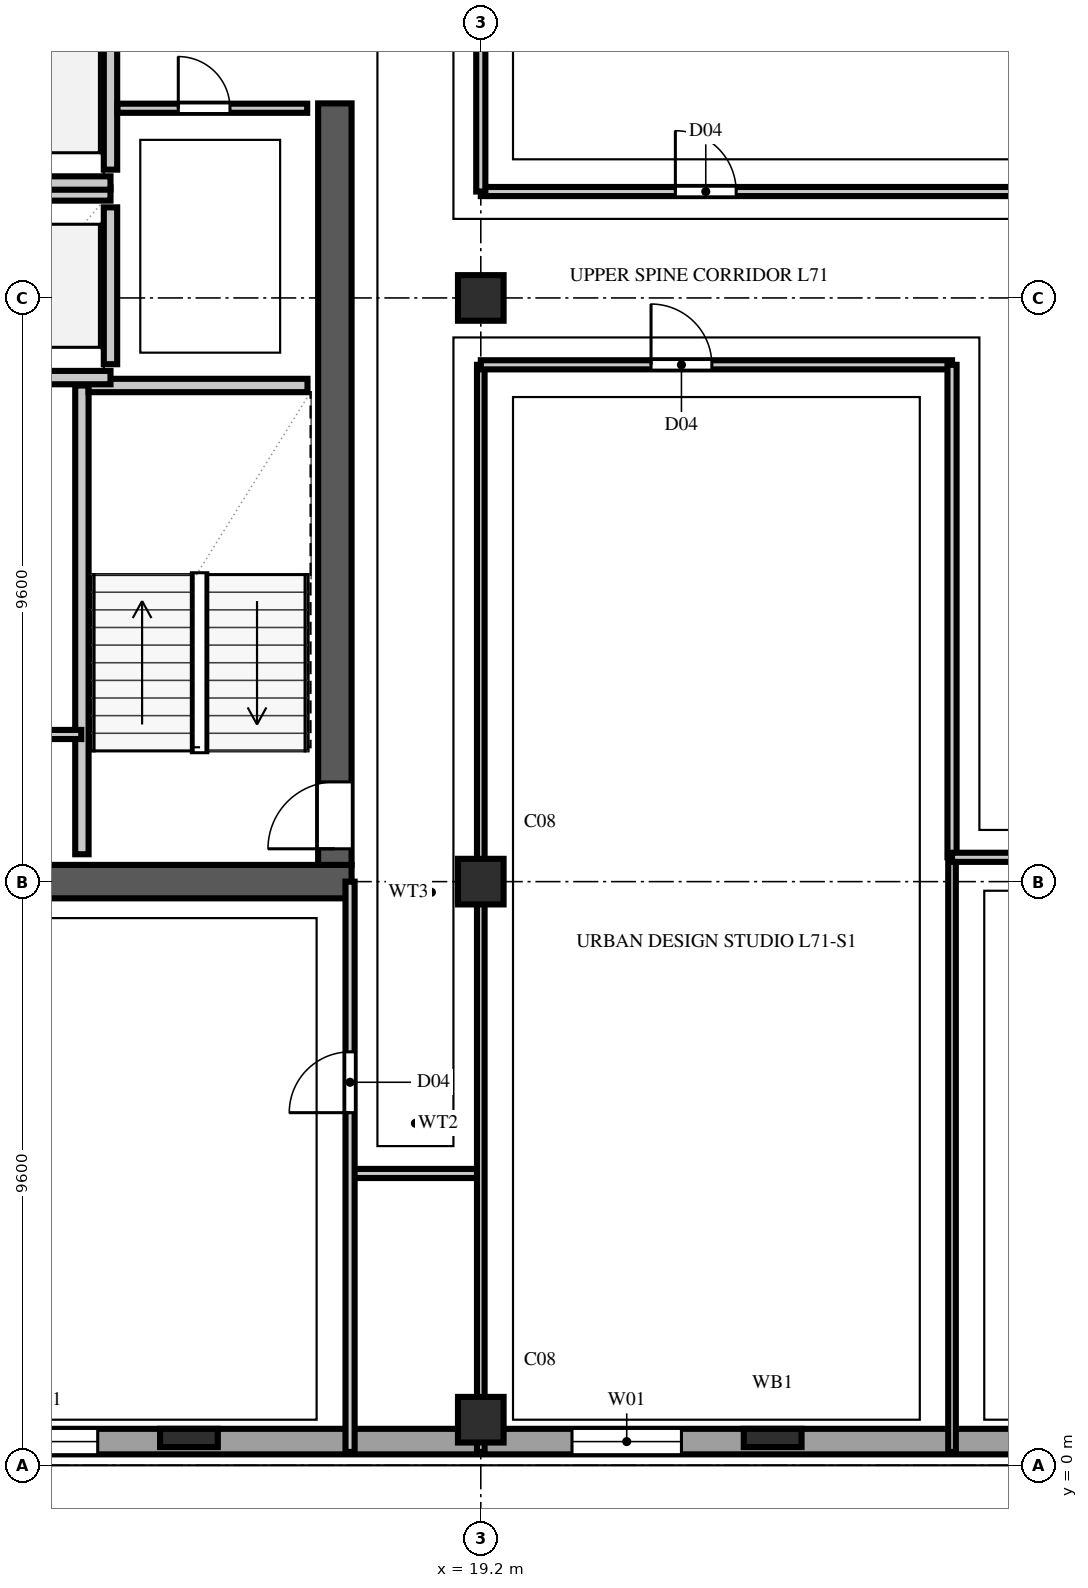
"""IFC4 building model, lengths in metres.
Left out: names, types, materials, properties, quantities, classifications, styles, units other than length and angle.
Written with IfcOpenShell. Run it as: python <this file> out.ifc"""

import sys

from ifc_helpers import new_model, si_unit, direction, frame, frame_2d, origin, origin_2d, place, context, subcontext, project, spatial, rectangle, extrude, element, fill, save


model = new_model("IFC4")
c1 = context("Model", 3, precision=1e-05, world=origin(), true_north=direction((0.0, 1.0)))
c2 = subcontext(c1, "Body", "Model", "MODEL_VIEW")
j1 = project(units=[si_unit("LENGTHUNIT", "METRE"), si_unit("PLANEANGLEUNIT", "RADIAN")], contexts=[c1])
p1 = place(None, origin())
s1 = spatial("IfcSite", under=j1, at=p1, CompositionType="ELEMENT")
p2 = place(p1, origin())
s2 = spatial("IfcBuilding", under=s1, at=p2, CompositionType="ELEMENT")
p3 = place(p2, frame((0.0, 0.0, 281.0)))
s3 = spatial("IfcBuildingStorey", under=s2, at=p3, CompositionType="ELEMENT", Elevation=281.0)
p4 = place(p3, frame((2.475, 9.6, 0.0), z_axis=(0.0, 0.0, 1.0), x_axis=(1.0, 0.0, 0.0)))
e1 = element("IfcWall", 1, at=p4, inside=s3, PredefinedType="SHEAR", context=c2, shape_type="SweptSolid", body=[
    extrude(rectangle(XDim=14.6, YDim=0.55, at=frame_2d((7.3, 0.0))), origin(), (0.0, 0.0, 1.0), 3.54),
])
p5 = place(p3, frame((16.8, 9.875, 0.0), z_axis=(0.0, 0.0, 1.0), x_axis=(0.0, 1.0, 0.0)))
e2 = element("IfcWall", 2, at=p5, inside=s3, PredefinedType="SHEAR", context=c2, shape_type="SweptSolid", body=[
    extrude(rectangle(XDim=12.525, YDim=0.55, at=frame_2d((6.262, 0.0))), origin(), (0.0, 0.0, 1.0), 3.54),
])
p6 = place(p5, frame((0.265, 0.0, 0.0)))
e3 = element("IfcOpeningElement", 3, at=p6, cuts=e2, PredefinedType="OPENING", context=c2, shape_type="SweptSolid", body=[
    extrude(rectangle(XDim=1.1, YDim=2.2, at=frame_2d((0.55, 1.1))), frame((0.0, 0.287, 0.0), z_axis=(0.0, -1.0, 0.0), x_axis=(1.0, 0.0, 0.0)), (0.0, 0.0, 1.0), 0.574),
])
for number, where, z_axis, x_axis in (
    (4, (19.2, 0.75, 0.0), (0.0, 0.0, 1.0), (1.0, 0.0, 0.0)),
    (5, (19.2, 9.6, 0.0), (0.0, 0.0, 1.0), (1.0, 0.0, 0.0)),
    (6, (19.2, 19.2, 0.0), (0.0, 0.0, 1.0), (1.0, 0.0, 0.0)),
):
    element("IfcColumn", number, at=place(p3, frame(where, z_axis=z_axis, x_axis=x_axis)), inside=s3, PredefinedType="COLUMN", context=c2, shape_type="SweptSolid", body=[
        extrude(rectangle(XDim=0.75, YDim=0.75, at=origin_2d()), origin(), (0.0, 0.0, 1.0), 3.8),
    ])
for number, where, z_axis, x_axis in (
    (7, (14.4, 0.45, 0.0), (0.0, 0.0, 1.0), (1.0, 0.0, 0.0)),
    (8, (24.0, 0.45, 0.0), (0.0, 0.0, 1.0), (1.0, 0.0, 0.0)),
):
    element("IfcColumn", number, at=place(p3, frame(where, z_axis=z_axis, x_axis=x_axis)), inside=s3, PredefinedType="PILASTER", context=c2, shape_type="SweptSolid", body=[
        extrude(rectangle(XDim=0.95, YDim=0.3, at=origin_2d()), origin(), (0.0, 0.0, 1.0), 3.8),
    ])
p7 = place(p3, frame((1.84, 0.39, 0.0), z_axis=(0.0, 0.0, 1.0), x_axis=(1.0, 0.0, 0.0)))
e9 = element("IfcWall", 9, at=p7, inside=s3, PredefinedType="SOLIDWALL", context=c2, shape_type="SweptSolid", body=[
    extrude(rectangle(XDim=44.32, YDim=0.42, at=frame_2d((22.16, 0.0))), origin(), (0.0, 0.0, 1.0), 3.54),
])
p8 = place(p7, frame((4.46, 0.0, 0.85)))
e10 = element("IfcOpeningElement", 10, at=p8, cuts=e9, PredefinedType="OPENING", context=c2, shape_type="SweptSolid", body=[
    extrude(rectangle(XDim=1.8, YDim=1.85, at=frame_2d((0.9, 0.925))), frame((0.0, 0.222, 0.0), z_axis=(0.0, -1.0, 0.0), x_axis=(1.0, 0.0, 0.0)), (0.0, 0.0, 1.0), 0.444),
])
p9 = place(p7, frame((9.26, 0.0, 0.85)))
e11 = element("IfcOpeningElement", 11, at=p9, cuts=e9, PredefinedType="OPENING", context=c2, shape_type="SweptSolid", body=[
    extrude(rectangle(XDim=1.8, YDim=1.85, at=frame_2d((0.9, 0.925))), frame((0.0, 0.222, 0.0), z_axis=(0.0, -1.0, 0.0), x_axis=(1.0, 0.0, 0.0)), (0.0, 0.0, 1.0), 0.444),
])
p10 = place(p7, frame((18.86, 0.0, 0.85)))
e12 = element("IfcOpeningElement", 12, at=p10, cuts=e9, PredefinedType="OPENING", context=c2, shape_type="SweptSolid", body=[
    extrude(rectangle(XDim=1.8, YDim=1.85, at=frame_2d((0.9, 0.925))), frame((0.0, 0.222, 0.0), z_axis=(0.0, -1.0, 0.0), x_axis=(1.0, 0.0, 0.0)), (0.0, 0.0, 1.0), 0.444),
])
p11 = place(p7, frame((28.46, 0.0, 0.85)))
e13 = element("IfcOpeningElement", 13, at=p11, cuts=e9, PredefinedType="OPENING", context=c2, shape_type="SweptSolid", body=[
    extrude(rectangle(XDim=1.8, YDim=1.85, at=frame_2d((0.9, 0.925))), frame((0.0, 0.222, 0.0), z_axis=(0.0, -1.0, 0.0), x_axis=(1.0, 0.0, 0.0)), (0.0, 0.0, 1.0), 0.444),
])
p12 = place(p7, frame((33.26, 0.0, 0.85)))
e14 = element("IfcOpeningElement", 14, at=p12, cuts=e9, PredefinedType="OPENING", context=c2, shape_type="SweptSolid", body=[
    extrude(rectangle(XDim=1.8, YDim=1.85, at=frame_2d((0.9, 0.925))), frame((0.0, 0.222, 0.0), z_axis=(0.0, -1.0, 0.0), x_axis=(1.0, 0.0, 0.0)), (0.0, 0.0, 1.0), 0.444),
])
p13 = place(p7, frame((38.06, 0.0, 0.85)))
e15 = element("IfcOpeningElement", 15, at=p13, cuts=e9, PredefinedType="OPENING", context=c2, shape_type="SweptSolid", body=[
    extrude(rectangle(XDim=1.8, YDim=1.85, at=frame_2d((0.9, 0.925))), frame((0.0, 0.222, 0.0), z_axis=(0.0, -1.0, 0.0), x_axis=(1.0, 0.0, 0.0)), (0.0, 0.0, 1.0), 0.444),
])
p14 = place(p3, frame((12.64, 10.05, 0.0), z_axis=(0.0, 0.0, 1.0), x_axis=(0.0, 1.0, 0.0)))
e16 = element("IfcWall", 16, at=p14, inside=s3, PredefinedType="SOLIDWALL", context=c2, shape_type="SweptSolid", body=[
    extrude(rectangle(XDim=7.71, YDim=0.22, at=frame_2d((3.855, 0.0))), origin(), (0.0, 0.0, 1.0), 3.54),
])
p15 = place(p3, frame((12.75, 17.76, 0.0), z_axis=(0.0, 0.0, 1.0), x_axis=(1.0, 0.0, 0.0)))
e17 = element("IfcWall", 17, at=p15, inside=s3, PredefinedType="SOLIDWALL", context=c2, shape_type="SweptSolid", body=[
    extrude(rectangle(XDim=3.6, YDim=0.22, at=frame_2d((1.8, 0.0))), origin(), (0.0, 0.0, 1.0), 3.54),
])
p16 = place(p3, frame((13.11, 18.11, 0.0), z_axis=(0.0, 0.0, 1.0), x_axis=(0.0, 1.0, 0.0)))
e18 = element("IfcWall", 18, at=p16, inside=s3, PredefinedType="SOLIDWALL", context=c2, shape_type="SweptSolid", body=[
    extrude(rectangle(XDim=2.58, YDim=0.22, at=frame_2d((1.29, 0.0))), origin(), (0.0, 0.0, 1.0), 3.54),
])
for number, where, z_axis, x_axis in (
    (19, (10.49, 17.89, 0.0), (0.0, 0.0, 1.0), (1.0, 0.0, 0.0)),
    (20, (10.49, 20.91, 0.0), (0.0, 0.0, 1.0), (1.0, 0.0, 0.0)),
):
    element("IfcWall", number, at=place(p3, frame(where, z_axis=z_axis, x_axis=x_axis)), inside=s3, PredefinedType="SOLIDWALL", context=c2, shape_type="SweptSolid", body=[
        extrude(rectangle(XDim=2.62, YDim=0.22, at=frame_2d((1.31, 0.0))), origin(), (0.0, 0.0, 1.0), 3.54),
    ])
p17 = place(p3, frame((13.11, 21.31, 0.0), z_axis=(0.0, 0.0, 1.0), x_axis=(0.0, 1.0, 0.0)))
e21 = element("IfcWall", 21, at=p17, inside=s3, PredefinedType="SOLIDWALL", context=c2, shape_type="SweptSolid", body=[
    extrude(rectangle(XDim=2.58, YDim=0.22, at=frame_2d((1.29, 0.0))), origin(), (0.0, 0.0, 1.0), 3.54),
])
p18 = place(p3, frame((10.49, 21.09, 0.0), z_axis=(0.0, 0.0, 1.0), x_axis=(1.0, 0.0, 0.0)))
e22 = element("IfcWall", 22, at=p18, inside=s3, PredefinedType="SOLIDWALL", context=c2, shape_type="SweptSolid", body=[
    extrude(rectangle(XDim=2.62, YDim=0.22, at=frame_2d((1.31, 0.0))), origin(), (0.0, 0.0, 1.0), 3.54),
])
p19 = place(p3, frame((10.55, 12.02, 0.0), z_axis=(0.0, 0.0, 1.0), x_axis=(1.0, 0.0, 0.0)))
e23 = element("IfcWall", 23, at=p19, inside=s3, PredefinedType="PARTITIONING", context=c2, shape_type="SweptSolid", body=[
    extrude(rectangle(XDim=2.08, YDim=0.15, at=frame_2d((1.04, 0.0))), origin(), (0.0, 0.0, 1.0), 3.54),
])
p20 = place(p19, frame((0.5, 0.0, 0.0)))
e24 = element("IfcOpeningElement", 24, at=p20, cuts=e23, PredefinedType="OPENING", context=c2, shape_type="SweptSolid", body=[
    extrude(rectangle(XDim=0.85, YDim=2.1, at=frame_2d((0.425, 1.05))), frame((0.0, 0.087, 0.0), z_axis=(0.0, -1.0, 0.0), x_axis=(1.0, 0.0, 0.0)), (0.0, 0.0, 1.0), 0.174),
])
p21 = place(p3, frame((13.225, 22.32, 0.0), z_axis=(0.0, 0.0, 1.0), x_axis=(1.0, 0.0, 0.0)))
e25 = element("IfcWall", 25, at=p21, inside=s3, PredefinedType="PARTITIONING", context=c2, shape_type="SweptSolid", body=[
    extrude(rectangle(XDim=3.12, YDim=0.15, at=frame_2d((1.56, 0.0))), origin(), (0.0, 0.0, 1.0), 3.54),
])
p22 = place(p21, frame((1.0, 0.0, 0.0)))
e26 = element("IfcOpeningElement", 26, at=p22, cuts=e25, PredefinedType="OPENING", context=c2, shape_type="SweptSolid", body=[
    extrude(rectangle(XDim=0.85, YDim=2.1, at=frame_2d((0.425, 1.05))), frame((0.0, 0.087, 0.0), z_axis=(0.0, -1.0, 0.0), x_axis=(1.0, 0.0, 0.0)), (0.0, 0.0, 1.0), 0.174),
])
p23 = place(p3, frame((17.05, 4.8, 0.0), z_axis=(0.0, 0.0, 1.0), x_axis=(1.0, 0.0, 0.0)))
e27 = element("IfcWall", 27, at=p23, inside=s3, PredefinedType="PARTITIONING", context=c2, shape_type="SweptSolid", body=[
    extrude(rectangle(XDim=2.15, YDim=0.15, at=frame_2d((1.075, 0.0))), origin(), (0.0, 0.0, 1.0), 3.54),
])
p24 = place(p3, frame((17.05, 0.22, 0.0), z_axis=(0.0, 0.0, 1.0), x_axis=(0.0, 1.0, 0.0)))
e28 = element("IfcWall", 28, at=p24, inside=s3, PredefinedType="PARTITIONING", context=c2, shape_type="SweptSolid", body=[
    extrude(rectangle(XDim=9.38, YDim=0.15, at=frame_2d((4.69, 0.0))), origin(), (0.0, 0.0, 1.0), 3.54),
])
p25 = place(p24, frame((5.58, 0.0, 0.0)))
e29 = element("IfcOpeningElement", 29, at=p25, cuts=e28, PredefinedType="OPENING", context=c2, shape_type="SweptSolid", body=[
    extrude(rectangle(XDim=1.0, YDim=2.2, at=frame_2d((0.5, 1.1))), frame((0.0, 0.087, 0.0), z_axis=(0.0, -1.0, 0.0), x_axis=(1.0, 0.0, 0.0)), (0.0, 0.0, 1.0), 0.174),
])
p26 = place(p3, frame((19.2, 0.22, 0.0), z_axis=(0.0, 0.0, 1.0), x_axis=(0.0, 1.0, 0.0)))
e30 = element("IfcWall", 30, at=p26, inside=s3, PredefinedType="PARTITIONING", context=c2, shape_type="SweptSolid", body=[
    extrude(rectangle(XDim=0.53, YDim=0.125, at=frame_2d((0.265, 0.0))), origin(), (0.0, 0.0, 1.0), 3.54),
])
p27 = place(p3, frame((19.2, 0.75, 0.0), z_axis=(0.0, 0.0, 1.0), x_axis=(0.0, 1.0, 0.0)))
e31 = element("IfcWall", 31, at=p27, inside=s3, PredefinedType="PARTITIONING", context=c2, shape_type="SweptSolid", body=[
    extrude(rectangle(XDim=17.35, YDim=0.125, at=frame_2d((8.675, 0.0))), origin(), (0.0, 0.0, 1.0), 2.923),
])
p28 = place(p3, frame((19.2, 18.1, 0.0), z_axis=(0.0, 0.0, 1.0), x_axis=(1.0, 0.0, 0.0)))
e32 = element("IfcWall", 32, at=p28, inside=s3, PredefinedType="PARTITIONING", context=c2, shape_type="SweptSolid", body=[
    extrude(rectangle(XDim=7.75, YDim=0.15, at=frame_2d((3.875, 0.0))), origin(), (0.0, 0.0, 1.0), 3.54),
])
p29 = place(p28, frame((2.8, 0.0, 0.0)))
e33 = element("IfcOpeningElement", 33, at=p29, cuts=e32, PredefinedType="OPENING", context=c2, shape_type="SweptSolid", body=[
    extrude(rectangle(XDim=1.0, YDim=2.2, at=frame_2d((0.5, 1.1))), frame((0.0, 0.087, 0.0), z_axis=(0.0, -1.0, 0.0), x_axis=(1.0, 0.0, 0.0)), (0.0, 0.0, 1.0), 0.174),
])
p30 = place(p3, frame((26.95, 0.22, 0.0), z_axis=(0.0, 0.0, 1.0), x_axis=(0.0, 1.0, 0.0)))
e34 = element("IfcWall", 34, at=p30, inside=s3, PredefinedType="PARTITIONING", context=c2, shape_type="SweptSolid", body=[
    extrude(rectangle(XDim=9.78, YDim=0.125, at=frame_2d((4.89, 0.0))), origin(), (0.0, 0.0, 1.0), 3.54),
])
p31 = place(p3, frame((26.95, 10.0, 0.0), z_axis=(0.0, 0.0, 1.0), x_axis=(0.0, 1.0, 0.0)))
e35 = element("IfcWall", 35, at=p31, inside=s3, PredefinedType="PARTITIONING", context=c2, shape_type="SweptSolid", body=[
    extrude(rectangle(XDim=8.1, YDim=0.15, at=frame_2d((4.05, 0.0))), origin(), (0.0, 0.0, 1.0), 3.54),
])
p32 = place(p3, frame((26.95, 10.0, 0.0), z_axis=(0.0, 0.0, 1.0), x_axis=(1.0, 0.0, 0.0)))
e36 = element("IfcWall", 36, at=p32, inside=s3, PredefinedType="PARTITIONING", context=c2, shape_type="SweptSolid", body=[
    extrude(rectangle(XDim=2.63, YDim=0.15, at=frame_2d((1.315, 0.0))), origin(), (0.0, 0.0, 1.0), 3.54),
])
p33 = place(p3, frame((19.2, 20.95, 0.0), z_axis=(0.0, 0.0, 1.0), x_axis=(1.0, 0.0, 0.0)))
e37 = element("IfcWall", 37, at=p33, inside=s3, PredefinedType="PARTITIONING", context=c2, shape_type="SweptSolid", body=[
    extrude(rectangle(XDim=10.15, YDim=0.15, at=frame_2d((5.075, 0.0))), origin(), (0.0, 0.0, 1.0), 3.54),
])
p34 = place(p33, frame((3.2, 0.0, 0.0)))
e38 = element("IfcOpeningElement", 38, at=p34, cuts=e37, PredefinedType="OPENING", context=c2, shape_type="SweptSolid", body=[
    extrude(rectangle(XDim=1.0, YDim=2.2, at=frame_2d((0.5, 1.1))), frame((0.0, 0.087, 0.0), z_axis=(0.0, -1.0, 0.0), x_axis=(1.0, 0.0, 0.0)), (0.0, 0.0, 1.0), 0.174),
])
p35 = place(p3, frame((19.2, 20.95, 0.0), z_axis=(0.0, 0.0, 1.0), x_axis=(0.0, 1.0, 0.0)))
e39 = element("IfcWall", 39, at=p35, inside=s3, PredefinedType="PARTITIONING", context=c2, shape_type="SweptSolid", body=[
    extrude(rectangle(XDim=17.45, YDim=0.15, at=frame_2d((8.725, 0.0))), origin(), (0.0, 0.0, 1.0), 2.923),
])
p36 = place(p35, frame((10.85, 0.0, 0.0)))
e40 = element("IfcOpeningElement", 40, at=p36, cuts=e39, PredefinedType="OPENING", context=c2, shape_type="SweptSolid", body=[
    extrude(rectangle(XDim=1.2, YDim=2.2, at=frame_2d((0.6, 1.1))), frame((0.0, 0.087, 0.0), z_axis=(0.0, -1.0, 0.0), x_axis=(1.0, 0.0, 0.0)), (0.0, 0.0, 1.0), 0.174),
])
p37 = place(p9, origin())
e41 = element("IfcWindow", 41, at=p37, inside=s3, PartitioningType="DOUBLE_PANEL_VERTICAL", PredefinedType="WINDOW", context=c2, shape_type="SweptSolid", body=[
    extrude(rectangle(XDim=1.8, YDim=1.85, at=frame_2d((0.9, 0.925))), frame((0.0, 0.11, 0.0), z_axis=(0.0, -1.0, 0.0), x_axis=(1.0, 0.0, 0.0)), (0.0, 0.0, 1.0), 0.06),
])
fill(e11, e41)
p38 = place(p10, origin())
e42 = element("IfcWindow", 42, at=p38, inside=s3, PartitioningType="DOUBLE_PANEL_VERTICAL", PredefinedType="WINDOW", context=c2, shape_type="SweptSolid", body=[
    extrude(rectangle(XDim=1.8, YDim=1.85, at=frame_2d((0.9, 0.925))), frame((0.0, 0.11, 0.0), z_axis=(0.0, -1.0, 0.0), x_axis=(1.0, 0.0, 0.0)), (0.0, 0.0, 1.0), 0.06),
])
fill(e12, e42)
p39 = place(p6, origin())
e43 = element("IfcDoor", 43, at=p39, inside=s3, OperationType="SINGLE_SWING_LEFT", PredefinedType="DOOR", context=c2, shape_type="SweptSolid", body=[
    extrude(rectangle(XDim=1.1, YDim=2.2, at=frame_2d((0.55, 1.1))), frame((0.0, 0.025, 0.0), z_axis=(0.0, -1.0, 0.0), x_axis=(1.0, 0.0, 0.0)), (0.0, 0.0, 1.0), 0.05),
])
fill(e3, e43)
p40 = place(p22, origin())
e44 = element("IfcDoor", 44, at=p40, inside=s3, OperationType="SINGLE_SWING_LEFT", PredefinedType="DOOR", context=c2, shape_type="SweptSolid", body=[
    extrude(rectangle(XDim=0.85, YDim=2.1, at=frame_2d((0.425, 1.05))), frame((0.0, 0.025, 0.0), z_axis=(0.0, -1.0, 0.0), x_axis=(1.0, 0.0, 0.0)), (0.0, 0.0, 1.0), 0.05),
])
fill(e26, e44)
p41 = place(p25, origin())
e45 = element("IfcDoor", 45, at=p41, inside=s3, OperationType="SINGLE_SWING_LEFT", PredefinedType="DOOR", context=c2, shape_type="SweptSolid", body=[
    extrude(rectangle(XDim=1.0, YDim=2.2, at=frame_2d((0.5, 1.1))), frame((0.0, 0.025, 0.0), z_axis=(0.0, -1.0, 0.0), x_axis=(1.0, 0.0, 0.0)), (0.0, 0.0, 1.0), 0.05),
])
fill(e29, e45)
p42 = place(p29, origin())
e46 = element("IfcDoor", 46, at=p42, inside=s3, OperationType="SINGLE_SWING_LEFT", PredefinedType="DOOR", context=c2, shape_type="SweptSolid", body=[
    extrude(rectangle(XDim=1.0, YDim=2.2, at=frame_2d((0.5, 1.1))), frame((0.0, 0.025, 0.0), z_axis=(0.0, -1.0, 0.0), x_axis=(1.0, 0.0, 0.0)), (0.0, 0.0, 1.0), 0.05),
])
fill(e33, e46)
p43 = place(p34, origin())
e47 = element("IfcDoor", 47, at=p43, inside=s3, OperationType="SINGLE_SWING_LEFT", PredefinedType="DOOR", context=c2, shape_type="SweptSolid", body=[
    extrude(rectangle(XDim=1.0, YDim=2.2, at=frame_2d((0.5, 1.1))), frame((0.0, 0.025, 0.0), z_axis=(0.0, -1.0, 0.0), x_axis=(1.0, 0.0, 0.0)), (0.0, 0.0, 1.0), 0.05),
])
fill(e38, e47)
save(model, sys.argv[1])
